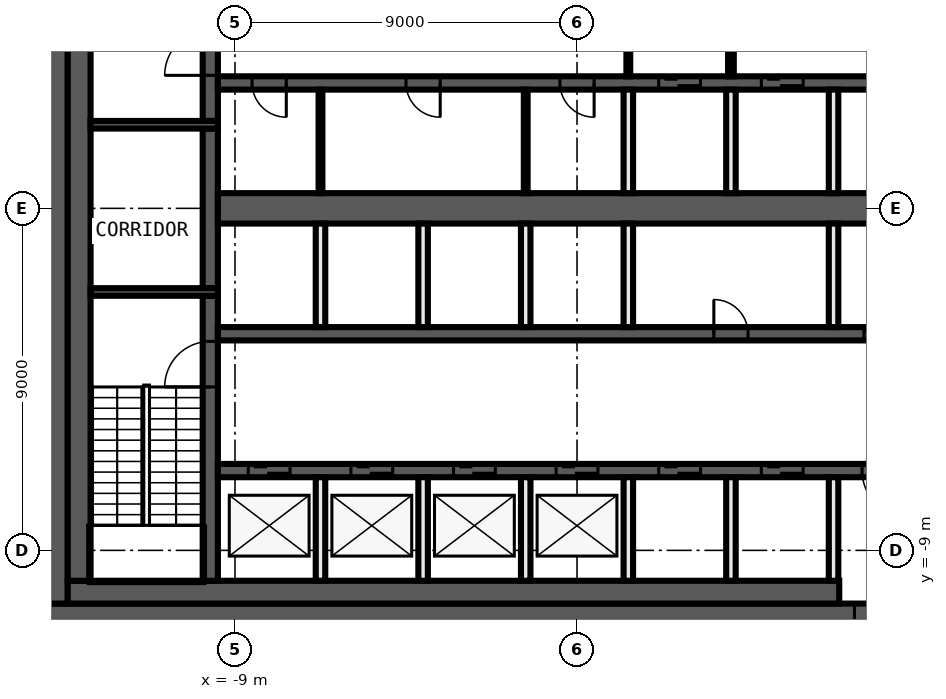
"""IFC4 building model, lengths in metres.
Left out: names, types, materials, properties, quantities, classifications, styles, units other than length and angle.
Written with IfcOpenShell. Run it as: python <this file> out.ifc"""

import sys

from ifc_helpers import new_model, si_unit, direction, frame, frame_2d, origin, place, context, subcontext, project, spatial, rectangle, extrude, element, fill, save


model = new_model("IFC4")
c1 = context("Model", 3, precision=1e-05, world=origin(), true_north=direction((0.0, 1.0)))
c2 = subcontext(c1, "Body", "Model", "MODEL_VIEW")
j1 = project(units=[si_unit("LENGTHUNIT", "METRE"), si_unit("PLANEANGLEUNIT", "RADIAN")], contexts=[c1])
p1 = place(None, origin())
s1 = spatial("IfcSite", under=j1, at=p1, CompositionType="ELEMENT")
p2 = place(p1, origin())
s2 = spatial("IfcBuilding", under=s1, at=p2, CompositionType="ELEMENT")
p3 = place(p2, frame((0.0, 0.0, 289.2)))
s3 = spatial("IfcBuildingStorey", under=s2, at=p3, CompositionType="ELEMENT", Elevation=289.2)
p4 = place(p3, frame((14.0, -10.7, 0.0), z_axis=(0.0, 0.0, 1.0), x_axis=(-1.0, 0.0, 0.0)))
e1 = element("IfcWall", 1, at=p4, inside=s3, PredefinedType="SHEAR", context=c2, shape_type="SweptSolid", body=[
    extrude(rectangle(XDim=28.0, YDim=0.6, at=frame_2d((14.0, 0.0))), origin(), (0.0, 0.0, 1.0), 4.62),
])
p5 = place(p4, frame((5.1, 0.0, 0.0)))
e2 = element("IfcOpeningElement", 2, at=p5, cuts=e1, PredefinedType="OPENING", context=c2, shape_type="SweptSolid", body=[
    extrude(rectangle(XDim=1.6, YDim=2.1, at=frame_2d((0.8, 1.05))), frame((0.0, 0.31, 0.0), z_axis=(0.0, -1.0, 0.0), x_axis=(1.0, 0.0, 0.0)), (0.0, 0.0, 1.0), 0.62),
])
p6 = place(p3, frame((-13.7, -10.4, 0.0), z_axis=(0.0, 0.0, 1.0), x_axis=(0.0, 1.0, 0.0)))
e3 = element("IfcWall", 3, at=p6, inside=s3, PredefinedType="SHEAR", context=c2, shape_type="SweptSolid", body=[
    extrude(rectangle(XDim=20.8, YDim=0.6, at=frame_2d((10.4, 0.0))), origin(), (0.0, 0.0, 1.0), 4.62),
])
p7 = place(p3, frame((6.9, -10.1, 0.0), z_axis=(0.0, 0.0, 1.0), x_axis=(-1.0, 0.0, 0.0)))
e4 = element("IfcWall", 4, at=p7, inside=s3, PredefinedType="SHEAR", context=c2, shape_type="SweptSolid", body=[
    extrude(rectangle(XDim=20.3, YDim=0.6, at=frame_2d((10.15, 0.0))), origin(), (0.0, 0.0, 1.0), 4.62),
])
p8 = place(p3, frame((-13.1, -9.8, 0.0), z_axis=(0.0, 0.0, 1.0), x_axis=(0.0, 1.0, 0.0)))
e5 = element("IfcWall", 5, at=p8, inside=s3, PredefinedType="SHEAR", context=c2, shape_type="SweptSolid", body=[
    extrude(rectangle(XDim=19.6, YDim=0.6, at=frame_2d((9.8, 0.0))), origin(), (0.0, 0.0, 1.0), 4.62),
])
p9 = place(p3, frame((-9.65, -9.8, 0.0), z_axis=(0.0, 0.0, 1.0), x_axis=(0.0, 1.0, 0.0)))
e6 = element("IfcWall", 6, at=p9, inside=s3, PredefinedType="SHEAR", context=c2, shape_type="SweptSolid", body=[
    extrude(rectangle(XDim=7.5, YDim=0.4, at=frame_2d((3.75, 0.0))), origin(), (0.0, 0.0, 1.0), 4.62),
])
p10 = place(p9, frame((5.1, 0.0, 0.0)))
e7 = element("IfcOpeningElement", 7, at=p10, cuts=e6, PredefinedType="OPENING", context=c2, shape_type="SweptSolid", body=[
    extrude(rectangle(XDim=1.2, YDim=2.1, at=frame_2d((0.6, 1.05))), frame((0.0, 0.21, 0.0), z_axis=(0.0, -1.0, 0.0), x_axis=(1.0, 0.0, 0.0)), (0.0, 0.0, 1.0), 0.42),
])
p11 = place(p3, frame((-9.65, -2.1, 0.0), z_axis=(0.0, 0.0, 1.0), x_axis=(0.0, 1.0, 0.0)))
e8 = element("IfcWall", 8, at=p11, inside=s3, PredefinedType="SHEAR", context=c2, shape_type="SweptSolid", body=[
    extrude(rectangle(XDim=4.2, YDim=0.4, at=frame_2d((2.1, 0.0))), origin(), (0.0, 0.0, 1.0), 4.62),
])
p12 = place(p3, frame((-9.65, 2.3, 0.0), z_axis=(0.0, 0.0, 1.0), x_axis=(0.0, 1.0, 0.0)))
e9 = element("IfcWall", 9, at=p12, inside=s3, PredefinedType="SHEAR", context=c2, shape_type="SweptSolid", body=[
    extrude(rectangle(XDim=7.5, YDim=0.4, at=frame_2d((3.75, 0.0))), origin(), (0.0, 0.0, 1.0), 4.62),
])
p13 = place(p12, frame((1.2, 0.0, 0.0)))
e10 = element("IfcOpeningElement", 10, at=p13, cuts=e9, PredefinedType="OPENING", context=c2, shape_type="SweptSolid", body=[
    extrude(rectangle(XDim=1.2, YDim=2.1, at=frame_2d((0.6, 1.05))), frame((0.0, 0.21, 0.0), z_axis=(0.0, -1.0, 0.0), x_axis=(1.0, 0.0, 0.0)), (0.0, 0.0, 1.0), 0.42),
])
for number, where, z_axis, x_axis in (
    (11, (-9.45, 2.2, 0.0), (0.0, 0.0, 1.0), (-1.0, 0.0, 0.0)),
    (12, (-9.45, -2.2, 0.0), (0.0, 0.0, 1.0), (-1.0, 0.0, 0.0)),
):
    element("IfcWall", number, at=place(p3, frame(where, z_axis=z_axis, x_axis=x_axis)), inside=s3, PredefinedType="SHEAR", context=c2, shape_type="SweptSolid", body=[
        extrude(rectangle(XDim=3.35, YDim=0.2, at=frame_2d((1.675, 0.0))), origin(), (0.0, 0.0, 1.0), 4.62),
    ])
p14 = place(p3, frame((9.45, 3.3, 0.0), z_axis=(0.0, 0.0, 1.0), x_axis=(-1.0, 0.0, 0.0)))
e13 = element("IfcWall", 13, at=p14, inside=s3, PredefinedType="SHEAR", context=c2, shape_type="SweptSolid", body=[
    extrude(rectangle(XDim=18.9, YDim=0.35, at=frame_2d((9.45, 0.0))), origin(), (0.0, 0.0, 1.0), 4.62),
])
p15 = place(p14, frame((6.2, 0.0, 0.0)))
e14 = element("IfcOpeningElement", 14, at=p15, cuts=e13, PredefinedType="OPENING", context=c2, shape_type="SweptSolid", body=[
    extrude(rectangle(XDim=1.1, YDim=2.1, at=frame_2d((0.55, 1.05))), frame((0.0, 0.185, 0.0), z_axis=(0.0, -1.0, 0.0), x_axis=(1.0, 0.0, 0.0)), (0.0, 0.0, 1.0), 0.37),
])
p16 = place(p14, frame((3.5, 0.0, 0.0)))
e15 = element("IfcOpeningElement", 15, at=p16, cuts=e13, PredefinedType="OPENING", context=c2, shape_type="SweptSolid", body=[
    extrude(rectangle(XDim=1.1, YDim=2.1, at=frame_2d((0.55, 1.05))), frame((0.0, 0.185, 0.0), z_axis=(0.0, -1.0, 0.0), x_axis=(1.0, 0.0, 0.0)), (0.0, 0.0, 1.0), 0.37),
])
p17 = place(p14, frame((0.9, 0.0, 0.0)))
e16 = element("IfcOpeningElement", 16, at=p17, cuts=e13, PredefinedType="OPENING", context=c2, shape_type="SweptSolid", body=[
    extrude(rectangle(XDim=0.9, YDim=2.1, at=frame_2d((0.45, 1.05))), frame((0.0, 0.185, 0.0), z_axis=(0.0, -1.0, 0.0), x_axis=(1.0, 0.0, 0.0)), (0.0, 0.0, 1.0), 0.37),
])
p18 = place(p14, frame((17.1, 0.0, 0.0)))
e17 = element("IfcOpeningElement", 17, at=p18, cuts=e13, PredefinedType="OPENING", context=c2, shape_type="SweptSolid", body=[
    extrude(rectangle(XDim=0.9, YDim=2.1, at=frame_2d((0.45, 1.05))), frame((0.0, 0.185, 0.0), z_axis=(0.0, -1.0, 0.0), x_axis=(1.0, 0.0, 0.0)), (0.0, 0.0, 1.0), 0.37),
])
p19 = place(p14, frame((13.05, 0.0, 0.0)))
e18 = element("IfcOpeningElement", 18, at=p19, cuts=e13, PredefinedType="OPENING", context=c2, shape_type="SweptSolid", body=[
    extrude(rectangle(XDim=0.9, YDim=2.1, at=frame_2d((0.45, 1.05))), frame((0.0, 0.185, 0.0), z_axis=(0.0, -1.0, 0.0), x_axis=(1.0, 0.0, 0.0)), (0.0, 0.0, 1.0), 0.37),
])
p20 = place(p14, frame((9.0, 0.0, 0.0)))
e19 = element("IfcOpeningElement", 19, at=p20, cuts=e13, PredefinedType="OPENING", context=c2, shape_type="SweptSolid", body=[
    extrude(rectangle(XDim=0.9, YDim=2.1, at=frame_2d((0.45, 1.05))), frame((0.0, 0.185, 0.0), z_axis=(0.0, -1.0, 0.0), x_axis=(1.0, 0.0, 0.0)), (0.0, 0.0, 1.0), 0.37),
])
p21 = place(p3, frame((-9.45, -3.3, 0.0), z_axis=(0.0, 0.0, 1.0), x_axis=(1.0, 0.0, 0.0)))
e20 = element("IfcWall", 20, at=p21, inside=s3, PredefinedType="SHEAR", context=c2, shape_type="SweptSolid", body=[
    extrude(rectangle(XDim=18.9, YDim=0.35, at=frame_2d((9.45, 0.0))), origin(), (0.0, 0.0, 1.0), 4.62),
])
p22 = place(p21, frame((17.0, 0.0, 0.0)))
e21 = element("IfcOpeningElement", 21, at=p22, cuts=e20, PredefinedType="OPENING", context=c2, shape_type="SweptSolid", body=[
    extrude(rectangle(XDim=1.1, YDim=2.1, at=frame_2d((0.55, 1.05))), frame((0.0, 0.185, 0.0), z_axis=(0.0, -1.0, 0.0), x_axis=(1.0, 0.0, 0.0)), (0.0, 0.0, 1.0), 0.37),
])
p23 = place(p21, frame((13.05, 0.0, 0.0)))
e22 = element("IfcOpeningElement", 22, at=p23, cuts=e20, PredefinedType="OPENING", context=c2, shape_type="SweptSolid", body=[
    extrude(rectangle(XDim=0.9, YDim=2.1, at=frame_2d((0.45, 1.05))), frame((0.0, 0.185, 0.0), z_axis=(0.0, -1.0, 0.0), x_axis=(1.0, 0.0, 0.0)), (0.0, 0.0, 1.0), 0.37),
])
p24 = place(p3, frame((9.45, -6.9, 0.0), z_axis=(0.0, 0.0, 1.0), x_axis=(-1.0, 0.0, 0.0)))
e23 = element("IfcWall", 23, at=p24, inside=s3, PredefinedType="SHEAR", context=c2, shape_type="SweptSolid", body=[
    extrude(rectangle(XDim=18.9, YDim=0.35, at=frame_2d((9.45, 0.0))), origin(), (0.0, 0.0, 1.0), 4.62),
])
p25 = place(p24, frame((17.0, 0.0, 0.0)))
e24 = element("IfcOpeningElement", 24, at=p25, cuts=e23, PredefinedType="OPENING", context=c2, shape_type="SweptSolid", body=[
    extrude(rectangle(XDim=1.1, YDim=2.1, at=frame_2d((0.55, 1.05))), frame((0.0, 0.185, 0.0), z_axis=(0.0, -1.0, 0.0), x_axis=(1.0, 0.0, 0.0)), (0.0, 0.0, 1.0), 0.37),
])
p26 = place(p24, frame((14.3, 0.0, 0.0)))
e25 = element("IfcOpeningElement", 25, at=p26, cuts=e23, PredefinedType="OPENING", context=c2, shape_type="SweptSolid", body=[
    extrude(rectangle(XDim=1.1, YDim=2.1, at=frame_2d((0.55, 1.05))), frame((0.0, 0.185, 0.0), z_axis=(0.0, -1.0, 0.0), x_axis=(1.0, 0.0, 0.0)), (0.0, 0.0, 1.0), 0.37),
])
p27 = place(p24, frame((11.6, 0.0, 0.0)))
e26 = element("IfcOpeningElement", 26, at=p27, cuts=e23, PredefinedType="OPENING", context=c2, shape_type="SweptSolid", body=[
    extrude(rectangle(XDim=1.1, YDim=2.1, at=frame_2d((0.55, 1.05))), frame((0.0, 0.185, 0.0), z_axis=(0.0, -1.0, 0.0), x_axis=(1.0, 0.0, 0.0)), (0.0, 0.0, 1.0), 0.37),
])
p28 = place(p24, frame((8.9, 0.0, 0.0)))
e27 = element("IfcOpeningElement", 27, at=p28, cuts=e23, PredefinedType="OPENING", context=c2, shape_type="SweptSolid", body=[
    extrude(rectangle(XDim=1.1, YDim=2.1, at=frame_2d((0.55, 1.05))), frame((0.0, 0.185, 0.0), z_axis=(0.0, -1.0, 0.0), x_axis=(1.0, 0.0, 0.0)), (0.0, 0.0, 1.0), 0.37),
])
p29 = place(p24, frame((6.2, 0.0, 0.0)))
e28 = element("IfcOpeningElement", 28, at=p29, cuts=e23, PredefinedType="OPENING", context=c2, shape_type="SweptSolid", body=[
    extrude(rectangle(XDim=1.1, YDim=2.1, at=frame_2d((0.55, 1.05))), frame((0.0, 0.185, 0.0), z_axis=(0.0, -1.0, 0.0), x_axis=(1.0, 0.0, 0.0)), (0.0, 0.0, 1.0), 0.37),
])
p30 = place(p24, frame((3.5, 0.0, 0.0)))
e29 = element("IfcOpeningElement", 29, at=p30, cuts=e23, PredefinedType="OPENING", context=c2, shape_type="SweptSolid", body=[
    extrude(rectangle(XDim=1.1, YDim=2.1, at=frame_2d((0.55, 1.05))), frame((0.0, 0.185, 0.0), z_axis=(0.0, -1.0, 0.0), x_axis=(1.0, 0.0, 0.0)), (0.0, 0.0, 1.0), 0.37),
])
p31 = place(p24, frame((0.75, 0.0, 0.0)))
e30 = element("IfcOpeningElement", 30, at=p31, cuts=e23, PredefinedType="OPENING", context=c2, shape_type="SweptSolid", body=[
    extrude(rectangle(XDim=1.2, YDim=2.1, at=frame_2d((0.6, 1.05))), frame((0.0, 0.185, 0.0), z_axis=(0.0, -1.0, 0.0), x_axis=(1.0, 0.0, 0.0)), (0.0, 0.0, 1.0), 0.37),
])
p32 = place(p3, frame((-9.45, 0.0, 0.0), z_axis=(0.0, 0.0, 1.0), x_axis=(1.0, 0.0, 0.0)))
e31 = element("IfcWall", 31, at=p32, inside=s3, PredefinedType="SHEAR", context=c2, shape_type="SweptSolid", body=[
    extrude(rectangle(XDim=18.9, YDim=0.8, at=frame_2d((9.45, 0.0))), origin(), (0.0, 0.0, 1.0), 4.62),
])
for number, where, z_axis, x_axis in (
    (32, (6.75, -9.8, 0.0), (0.0, 0.0, 1.0), (0.0, 1.0, 0.0)),
    (33, (6.75, -3.125, 0.0), (0.0, 0.0, 1.0), (0.0, 1.0, 0.0)),
    (34, (6.75, 0.4, 0.0), (0.0, 0.0, 1.0), (0.0, 1.0, 0.0)),
):
    element("IfcWall", number, at=place(p3, frame(where, z_axis=z_axis, x_axis=x_axis)), inside=s3, PredefinedType="SOLIDWALL", context=c2, shape_type="SweptSolid", body=[
        extrude(rectangle(XDim=2.725, YDim=0.25, at=frame_2d((1.363, 0.0))), origin(), (0.0, 0.0, 1.0), 4.62),
    ])
p33 = place(p3, frame((4.05, 6.725, 0.0), z_axis=(0.0, 0.0, 1.0), x_axis=(0.0, -1.0, 0.0)))
e35 = element("IfcWall", 35, at=p33, inside=s3, PredefinedType="PARTITIONING", context=c2, shape_type="SweptSolid", body=[
    extrude(rectangle(XDim=3.25, YDim=0.15, at=frame_2d((1.625, 0.0))), origin(), (0.0, 0.0, 1.0), 4.62),
])
p34 = place(p33, frame((1.025, 0.0, 0.0)))
e36 = element("IfcOpeningElement", 36, at=p34, cuts=e35, PredefinedType="OPENING", context=c2, shape_type="SweptSolid", body=[
    extrude(rectangle(XDim=1.2, YDim=2.1, at=frame_2d((0.6, 1.05))), frame((0.0, 0.085, 0.0), z_axis=(0.0, -1.0, 0.0), x_axis=(1.0, 0.0, 0.0)), (0.0, 0.0, 1.0), 0.17),
])
for number, where, z_axis, x_axis in (
    (37, (4.05, -9.8, 0.0), (0.0, 0.0, 1.0), (0.0, 1.0, 0.0)),
    (38, (4.05, 0.4, 0.0), (0.0, 0.0, 1.0), (0.0, 1.0, 0.0)),
):
    element("IfcWall", number, at=place(p3, frame(where, z_axis=z_axis, x_axis=x_axis)), inside=s3, PredefinedType="SOLIDWALL", context=c2, shape_type="SweptSolid", body=[
        extrude(rectangle(XDim=2.725, YDim=0.25, at=frame_2d((1.363, 0.0))), origin(), (0.0, 0.0, 1.0), 4.62),
    ])
p35 = place(p3, frame((1.35, 6.725, 0.0), z_axis=(0.0, 0.0, 1.0), x_axis=(0.0, -1.0, 0.0)))
e39 = element("IfcWall", 39, at=p35, inside=s3, PredefinedType="PARTITIONING", context=c2, shape_type="SweptSolid", body=[
    extrude(rectangle(XDim=3.25, YDim=0.1, at=frame_2d((1.625, 0.0))), origin(), (0.0, 0.0, 1.0), 4.62),
])
p36 = place(p35, frame((1.025, 0.0, 0.0)))
e40 = element("IfcOpeningElement", 40, at=p36, cuts=e39, PredefinedType="OPENING", context=c2, shape_type="SweptSolid", body=[
    extrude(rectangle(XDim=1.2, YDim=2.1, at=frame_2d((0.6, 1.05))), frame((0.0, 0.06, 0.0), z_axis=(0.0, -1.0, 0.0), x_axis=(1.0, 0.0, 0.0)), (0.0, 0.0, 1.0), 0.12),
])
for number, where, z_axis, x_axis in (
    (41, (1.35, -9.8, 0.0), (0.0, 0.0, 1.0), (0.0, 1.0, 0.0)),
    (42, (1.35, -3.125, 0.0), (0.0, 0.0, 1.0), (0.0, 1.0, 0.0)),
    (43, (1.35, 0.4, 0.0), (0.0, 0.0, 1.0), (0.0, 1.0, 0.0)),
):
    element("IfcWall", number, at=place(p3, frame(where, z_axis=z_axis, x_axis=x_axis)), inside=s3, PredefinedType="SOLIDWALL", context=c2, shape_type="SweptSolid", body=[
        extrude(rectangle(XDim=2.725, YDim=0.25, at=frame_2d((1.363, 0.0))), origin(), (0.0, 0.0, 1.0), 4.62),
    ])
p37 = place(p3, frame((-1.35, 0.4, 0.0), z_axis=(0.0, 0.0, 1.0), x_axis=(0.0, 1.0, 0.0)))
e44 = element("IfcWall", 44, at=p37, inside=s3, PredefinedType="PARTITIONING", context=c2, shape_type="SweptSolid", body=[
    extrude(rectangle(XDim=2.725, YDim=0.1, at=frame_2d((1.363, 0.0))), origin(), (0.0, 0.0, 1.0), 4.62),
])
for number, where, z_axis, x_axis in (
    (45, (-1.35, -9.8, 0.0), (0.0, 0.0, 1.0), (0.0, 1.0, 0.0)),
    (46, (-1.35, -3.125, 0.0), (0.0, 0.0, 1.0), (0.0, 1.0, 0.0)),
    (47, (-4.05, -9.8, 0.0), (0.0, 0.0, 1.0), (0.0, 1.0, 0.0)),
    (48, (-4.05, -3.125, 0.0), (0.0, 0.0, 1.0), (0.0, 1.0, 0.0)),
):
    element("IfcWall", number, at=place(p3, frame(where, z_axis=z_axis, x_axis=x_axis)), inside=s3, PredefinedType="SOLIDWALL", context=c2, shape_type="SweptSolid", body=[
        extrude(rectangle(XDim=2.725, YDim=0.25, at=frame_2d((1.363, 0.0))), origin(), (0.0, 0.0, 1.0), 4.62),
    ])
p38 = place(p3, frame((-6.75, 0.4, 0.0), z_axis=(0.0, 0.0, 1.0), x_axis=(0.0, 1.0, 0.0)))
e49 = element("IfcWall", 49, at=p38, inside=s3, PredefinedType="PARTITIONING", context=c2, shape_type="SweptSolid", body=[
    extrude(rectangle(XDim=2.725, YDim=0.1, at=frame_2d((1.363, 0.0))), origin(), (0.0, 0.0, 1.0), 4.62),
])
for number, where, z_axis, x_axis in (
    (50, (-6.75, -9.8, 0.0), (0.0, 0.0, 1.0), (0.0, 1.0, 0.0)),
    (51, (-6.75, -3.125, 0.0), (0.0, 0.0, 1.0), (0.0, 1.0, 0.0)),
):
    element("IfcWall", number, at=place(p3, frame(where, z_axis=z_axis, x_axis=x_axis)), inside=s3, PredefinedType="SOLIDWALL", context=c2, shape_type="SweptSolid", body=[
        extrude(rectangle(XDim=2.725, YDim=0.25, at=frame_2d((1.363, 0.0))), origin(), (0.0, 0.0, 1.0), 4.62),
    ])
p39 = place(p15, origin())
e52 = element("IfcDoor", 52, at=p39, inside=s3, OperationType="DOUBLE_DOOR_SLIDING", PredefinedType="DOOR", context=c2, shape_type="SweptSolid", body=[
    extrude(rectangle(XDim=1.1, YDim=2.1, at=frame_2d((0.55, 1.05))), frame((0.0, 0.025, 0.0), z_axis=(0.0, -1.0, 0.0), x_axis=(1.0, 0.0, 0.0)), (0.0, 0.0, 1.0), 0.05),
])
fill(e14, e52)
p40 = place(p16, origin())
e53 = element("IfcDoor", 53, at=p40, inside=s3, OperationType="DOUBLE_DOOR_SLIDING", PredefinedType="DOOR", context=c2, shape_type="SweptSolid", body=[
    extrude(rectangle(XDim=1.1, YDim=2.1, at=frame_2d((0.55, 1.05))), frame((0.0, 0.025, 0.0), z_axis=(0.0, -1.0, 0.0), x_axis=(1.0, 0.0, 0.0)), (0.0, 0.0, 1.0), 0.05),
])
fill(e15, e53)
p41 = place(p22, origin())
e54 = element("IfcDoor", 54, at=p41, inside=s3, OperationType="DOUBLE_DOOR_SLIDING", PredefinedType="DOOR", context=c2, shape_type="SweptSolid", body=[
    extrude(rectangle(XDim=1.1, YDim=2.1, at=frame_2d((0.55, 1.05))), frame((0.0, 0.025, 0.0), z_axis=(0.0, -1.0, 0.0), x_axis=(1.0, 0.0, 0.0)), (0.0, 0.0, 1.0), 0.05),
])
fill(e21, e54)
p42 = place(p25, origin())
e55 = element("IfcDoor", 55, at=p42, inside=s3, OperationType="DOUBLE_DOOR_SLIDING", PredefinedType="DOOR", context=c2, shape_type="SweptSolid", body=[
    extrude(rectangle(XDim=1.1, YDim=2.1, at=frame_2d((0.55, 1.05))), frame((0.0, 0.025, 0.0), z_axis=(0.0, -1.0, 0.0), x_axis=(1.0, 0.0, 0.0)), (0.0, 0.0, 1.0), 0.05),
])
fill(e24, e55)
p43 = place(p26, origin())
e56 = element("IfcDoor", 56, at=p43, inside=s3, OperationType="DOUBLE_DOOR_SLIDING", PredefinedType="DOOR", context=c2, shape_type="SweptSolid", body=[
    extrude(rectangle(XDim=1.1, YDim=2.1, at=frame_2d((0.55, 1.05))), frame((0.0, 0.025, 0.0), z_axis=(0.0, -1.0, 0.0), x_axis=(1.0, 0.0, 0.0)), (0.0, 0.0, 1.0), 0.05),
])
fill(e25, e56)
p44 = place(p27, origin())
e57 = element("IfcDoor", 57, at=p44, inside=s3, OperationType="DOUBLE_DOOR_SLIDING", PredefinedType="DOOR", context=c2, shape_type="SweptSolid", body=[
    extrude(rectangle(XDim=1.1, YDim=2.1, at=frame_2d((0.55, 1.05))), frame((0.0, 0.025, 0.0), z_axis=(0.0, -1.0, 0.0), x_axis=(1.0, 0.0, 0.0)), (0.0, 0.0, 1.0), 0.05),
])
fill(e26, e57)
p45 = place(p28, origin())
e58 = element("IfcDoor", 58, at=p45, inside=s3, OperationType="DOUBLE_DOOR_SLIDING", PredefinedType="DOOR", context=c2, shape_type="SweptSolid", body=[
    extrude(rectangle(XDim=1.1, YDim=2.1, at=frame_2d((0.55, 1.05))), frame((0.0, 0.025, 0.0), z_axis=(0.0, -1.0, 0.0), x_axis=(1.0, 0.0, 0.0)), (0.0, 0.0, 1.0), 0.05),
])
fill(e27, e58)
p46 = place(p29, origin())
e59 = element("IfcDoor", 59, at=p46, inside=s3, OperationType="DOUBLE_DOOR_SLIDING", PredefinedType="DOOR", context=c2, shape_type="SweptSolid", body=[
    extrude(rectangle(XDim=1.1, YDim=2.1, at=frame_2d((0.55, 1.05))), frame((0.0, 0.025, 0.0), z_axis=(0.0, -1.0, 0.0), x_axis=(1.0, 0.0, 0.0)), (0.0, 0.0, 1.0), 0.05),
])
fill(e28, e59)
p47 = place(p30, origin())
e60 = element("IfcDoor", 60, at=p47, inside=s3, OperationType="DOUBLE_DOOR_SLIDING", PredefinedType="DOOR", context=c2, shape_type="SweptSolid", body=[
    extrude(rectangle(XDim=1.1, YDim=2.1, at=frame_2d((0.55, 1.05))), frame((0.0, 0.025, 0.0), z_axis=(0.0, -1.0, 0.0), x_axis=(1.0, 0.0, 0.0)), (0.0, 0.0, 1.0), 0.05),
])
fill(e29, e60)
p48 = place(p5, origin())
e61 = element("IfcDoor", 61, at=p48, inside=s3, OperationType="DOUBLE_DOOR_SINGLE_SWING", PredefinedType="DOOR", context=c2, shape_type="SweptSolid", body=[
    extrude(rectangle(XDim=1.6, YDim=2.1, at=frame_2d((0.8, 1.05))), frame((0.0, 0.025, 0.0), z_axis=(0.0, -1.0, 0.0), x_axis=(1.0, 0.0, 0.0)), (0.0, 0.0, 1.0), 0.05),
])
fill(e2, e61)
p49 = place(p31, origin())
e62 = element("IfcDoor", 62, at=p49, inside=s3, OperationType="SINGLE_SWING_LEFT", PredefinedType="DOOR", context=c2, shape_type="SweptSolid", body=[
    extrude(rectangle(XDim=1.2, YDim=2.1, at=frame_2d((0.6, 1.05))), frame((0.0, 0.025, 0.0), z_axis=(0.0, -1.0, 0.0), x_axis=(1.0, 0.0, 0.0)), (0.0, 0.0, 1.0), 0.05),
])
fill(e30, e62)
p50 = place(p18, origin())
e63 = element("IfcDoor", 63, at=p50, inside=s3, OperationType="SINGLE_SWING_RIGHT", PredefinedType="DOOR", context=c2, shape_type="SweptSolid", body=[
    extrude(rectangle(XDim=0.9, YDim=2.1, at=frame_2d((0.45, 1.05))), frame((0.0, 0.025, 0.0), z_axis=(0.0, -1.0, 0.0), x_axis=(1.0, 0.0, 0.0)), (0.0, 0.0, 1.0), 0.05),
])
fill(e17, e63)
p51 = place(p19, origin())
e64 = element("IfcDoor", 64, at=p51, inside=s3, OperationType="SINGLE_SWING_LEFT", PredefinedType="DOOR", context=c2, shape_type="SweptSolid", body=[
    extrude(rectangle(XDim=0.9, YDim=2.1, at=frame_2d((0.45, 1.05))), frame((0.0, 0.025, 0.0), z_axis=(0.0, -1.0, 0.0), x_axis=(1.0, 0.0, 0.0)), (0.0, 0.0, 1.0), 0.05),
])
fill(e18, e64)
p52 = place(p20, origin())
e65 = element("IfcDoor", 65, at=p52, inside=s3, OperationType="SINGLE_SWING_RIGHT", PredefinedType="DOOR", context=c2, shape_type="SweptSolid", body=[
    extrude(rectangle(XDim=0.9, YDim=2.1, at=frame_2d((0.45, 1.05))), frame((0.0, 0.025, 0.0), z_axis=(0.0, -1.0, 0.0), x_axis=(1.0, 0.0, 0.0)), (0.0, 0.0, 1.0), 0.05),
])
fill(e19, e65)
p53 = place(p23, origin())
e66 = element("IfcDoor", 66, at=p53, inside=s3, OperationType="SINGLE_SWING_LEFT", PredefinedType="DOOR", context=c2, shape_type="SweptSolid", body=[
    extrude(rectangle(XDim=0.9, YDim=2.1, at=frame_2d((0.45, 1.05))), frame((0.0, 0.025, 0.0), z_axis=(0.0, -1.0, 0.0), x_axis=(1.0, 0.0, 0.0)), (0.0, 0.0, 1.0), 0.05),
])
fill(e22, e66)
p54 = place(p13, origin())
e67 = element("IfcDoor", 67, at=p54, inside=s3, OperationType="SINGLE_SWING_RIGHT", PredefinedType="DOOR", context=c2, shape_type="SweptSolid", body=[
    extrude(rectangle(XDim=1.2, YDim=2.1, at=frame_2d((0.6, 1.05))), frame((0.0, 0.025, 0.0), z_axis=(0.0, -1.0, 0.0), x_axis=(1.0, 0.0, 0.0)), (0.0, 0.0, 1.0), 0.05),
])
fill(e10, e67)
p55 = place(p10, origin())
e68 = element("IfcDoor", 68, at=p55, inside=s3, OperationType="SINGLE_SWING_LEFT", PredefinedType="DOOR", context=c2, shape_type="SweptSolid", body=[
    extrude(rectangle(XDim=1.2, YDim=2.1, at=frame_2d((0.6, 1.05))), frame((0.0, 0.025, 0.0), z_axis=(0.0, -1.0, 0.0), x_axis=(1.0, 0.0, 0.0)), (0.0, 0.0, 1.0), 0.05),
])
fill(e7, e68)
save(model, sys.argv[1])
